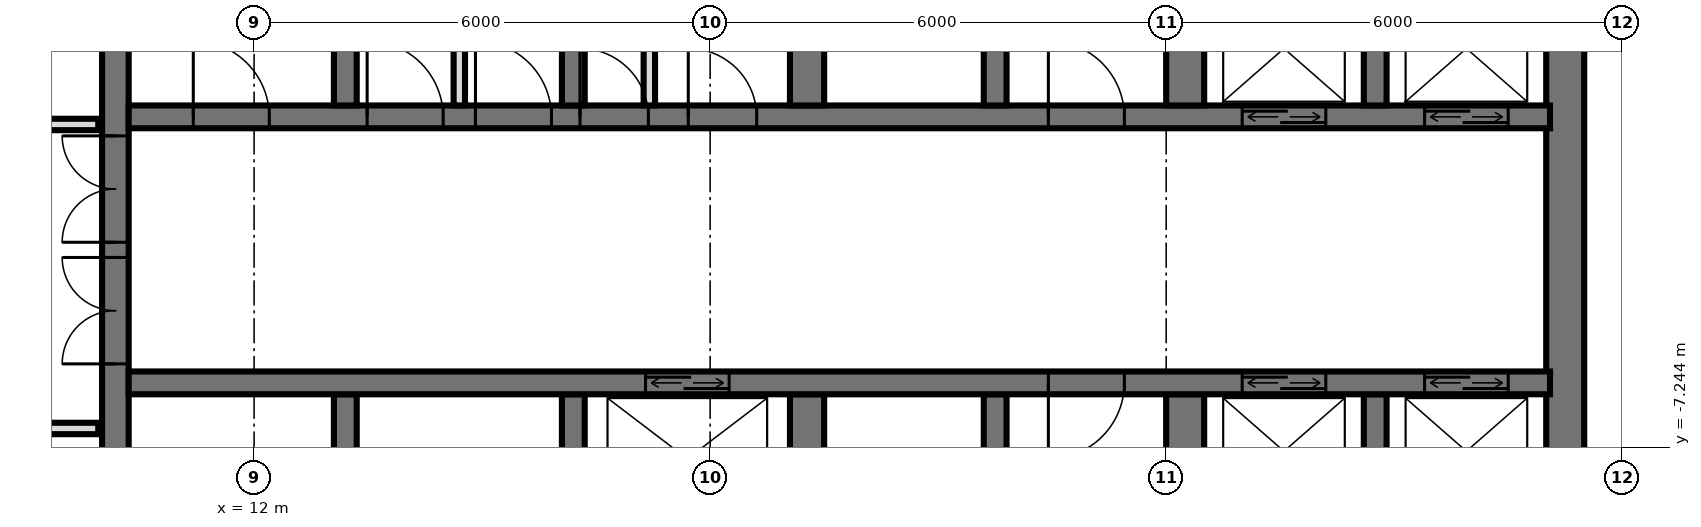
"""IFC4 building model, lengths in metres.
Left out: names, types, materials, properties, quantities, classifications, styles, units other than length and angle.
Written with IfcOpenShell. Run it as: python <this file> out.ifc"""

import sys

from ifc_helpers import new_model, si_unit, direction, frame, frame_2d, origin, place, context, subcontext, project, spatial, rectangle, extrude, element, fill, save


model = new_model("IFC4")
c1 = context("Model", 3, precision=1e-05, world=origin(), true_north=direction((0.0, 1.0)))
c2 = subcontext(c1, "Body", "Model", "MODEL_VIEW")
j1 = project(units=[si_unit("LENGTHUNIT", "METRE"), si_unit("PLANEANGLEUNIT", "RADIAN")], contexts=[c1])
p1 = place(None, origin())
s1 = spatial("IfcSite", under=j1, at=p1, CompositionType="ELEMENT")
p2 = place(p1, origin())
s2 = spatial("IfcBuilding", under=s1, at=p2, CompositionType="ELEMENT")
p3 = place(p2, frame((0.0, 0.0, 78.0)))
s3 = spatial("IfcBuildingStorey", under=s2, at=p3, CompositionType="ELEMENT", Elevation=78.0)
p4 = place(p3, frame((10.175, -14.55, 0.0), z_axis=(0.0, 0.0, 1.0), x_axis=(0.0, 1.0, 0.0)))
e1 = element("IfcWall", 1, at=p4, inside=s3, PredefinedType="SHEAR", context=c2, shape_type="SweptSolid", body=[
    extrude(rectangle(XDim=14.1, YDim=0.35, at=frame_2d((7.05, 0.0))), origin(), (0.0, 0.0, 1.0), 3.6),
])
p5 = place(p4, frame((8.4, 0.0, 0.0)))
e2 = element("IfcOpeningElement", 2, at=p5, cuts=e1, PredefinedType="OPENING", context=c2, shape_type="SweptSolid", body=[
    extrude(rectangle(XDim=1.4, YDim=2.4, at=frame_2d((0.7, 1.2))), frame((0.0, 0.185, 0.0), z_axis=(0.0, -1.0, 0.0), x_axis=(1.0, 0.0, 0.0)), (0.0, 0.0, 1.0), 0.37),
])
p6 = place(p4, frame((10.0, 0.0, 0.0)))
e3 = element("IfcOpeningElement", 3, at=p6, cuts=e1, PredefinedType="OPENING", context=c2, shape_type="SweptSolid", body=[
    extrude(rectangle(XDim=1.4, YDim=2.4, at=frame_2d((0.7, 1.2))), frame((0.0, 0.185, 0.0), z_axis=(0.0, -1.0, 0.0), x_axis=(1.0, 0.0, 0.0)), (0.0, 0.0, 1.0), 0.37),
])
p7 = place(p4, frame((4.0, 0.0, 0.0)))
e4 = element("IfcOpeningElement", 4, at=p7, cuts=e1, PredefinedType="OPENING", context=c2, shape_type="SweptSolid", body=[
    extrude(rectangle(XDim=1.2, YDim=2.1, at=frame_2d((0.6, 1.05))), frame((0.0, 0.185, 0.0), z_axis=(0.0, -1.0, 0.0), x_axis=(1.0, 0.0, 0.0)), (0.0, 0.0, 1.0), 0.37),
])
p8 = place(p3, frame((29.25, -14.55, 0.0), z_axis=(0.0, 0.0, 1.0), x_axis=(0.0, 1.0, 0.0)))
e5 = element("IfcWall", 5, at=p8, inside=s3, PredefinedType="SHEAR", context=c2, shape_type="SweptSolid", body=[
    extrude(rectangle(XDim=14.1, YDim=0.5, at=frame_2d((7.05, 0.0))), origin(), (0.0, 0.0, 1.0), 3.6),
])
p9 = place(p3, frame((10.35, -2.9, 0.0), z_axis=(0.0, 0.0, 1.0), x_axis=(1.0, 0.0, 0.0)))
e6 = element("IfcWall", 6, at=p9, inside=s3, PredefinedType="SHEAR", context=c2, shape_type="SweptSolid", body=[
    extrude(rectangle(XDim=18.7, YDim=0.3, at=frame_2d((9.35, 0.0))), origin(), (0.0, 0.0, 1.0), 3.6),
])
p10 = place(p9, frame((14.65, 0.0, 0.0)))
e7 = element("IfcOpeningElement", 7, at=p10, cuts=e6, PredefinedType="OPENING", context=c2, shape_type="SweptSolid", body=[
    extrude(rectangle(XDim=1.1, YDim=2.1, at=frame_2d((0.55, 1.05))), frame((0.0, 0.16, 0.0), z_axis=(0.0, -1.0, 0.0), x_axis=(1.0, 0.0, 0.0)), (0.0, 0.0, 1.0), 0.32),
])
p11 = place(p9, frame((17.05, 0.0, 0.0)))
e8 = element("IfcOpeningElement", 8, at=p11, cuts=e6, PredefinedType="OPENING", context=c2, shape_type="SweptSolid", body=[
    extrude(rectangle(XDim=1.1, YDim=2.1, at=frame_2d((0.55, 1.05))), frame((0.0, 0.16, 0.0), z_axis=(0.0, -1.0, 0.0), x_axis=(1.0, 0.0, 0.0)), (0.0, 0.0, 1.0), 0.32),
])
p12 = place(p9, frame((5.938, 0.0, 0.0)))
e9 = element("IfcOpeningElement", 9, at=p12, cuts=e6, PredefinedType="OPENING", context=c2, shape_type="SweptSolid", body=[
    extrude(rectangle(XDim=0.9, YDim=2.1, at=frame_2d((0.45, 1.05))), frame((0.0, 0.16, 0.0), z_axis=(0.0, -1.0, 0.0), x_axis=(1.0, 0.0, 0.0)), (0.0, 0.0, 1.0), 0.32),
])
p13 = place(p9, frame((7.363, 0.0, 0.0)))
e10 = element("IfcOpeningElement", 10, at=p13, cuts=e6, PredefinedType="OPENING", context=c2, shape_type="SweptSolid", body=[
    extrude(rectangle(XDim=0.9, YDim=2.1, at=frame_2d((0.45, 1.05))), frame((0.0, 0.16, 0.0), z_axis=(0.0, -1.0, 0.0), x_axis=(1.0, 0.0, 0.0)), (0.0, 0.0, 1.0), 0.32),
])
p14 = place(p9, frame((0.85, 0.0, 0.0)))
e11 = element("IfcOpeningElement", 11, at=p14, cuts=e6, PredefinedType="OPENING", context=c2, shape_type="SweptSolid", body=[
    extrude(rectangle(XDim=1.0, YDim=2.1, at=frame_2d((0.5, 1.05))), frame((0.0, 0.16, 0.0), z_axis=(0.0, -1.0, 0.0), x_axis=(1.0, 0.0, 0.0)), (0.0, 0.0, 1.0), 0.32),
])
p15 = place(p9, frame((3.137, 0.0, 0.0)))
e12 = element("IfcOpeningElement", 12, at=p15, cuts=e6, PredefinedType="OPENING", context=c2, shape_type="SweptSolid", body=[
    extrude(rectangle(XDim=1.0, YDim=2.1, at=frame_2d((0.5, 1.05))), frame((0.0, 0.16, 0.0), z_axis=(0.0, -1.0, 0.0), x_axis=(1.0, 0.0, 0.0)), (0.0, 0.0, 1.0), 0.32),
])
p16 = place(p9, frame((4.562, 0.0, 0.0)))
e13 = element("IfcOpeningElement", 13, at=p16, cuts=e6, PredefinedType="OPENING", context=c2, shape_type="SweptSolid", body=[
    extrude(rectangle(XDim=1.0, YDim=2.1, at=frame_2d((0.5, 1.05))), frame((0.0, 0.16, 0.0), z_axis=(0.0, -1.0, 0.0), x_axis=(1.0, 0.0, 0.0)), (0.0, 0.0, 1.0), 0.32),
])
p17 = place(p9, frame((12.1, 0.0, 0.0)))
e14 = element("IfcOpeningElement", 14, at=p17, cuts=e6, PredefinedType="OPENING", context=c2, shape_type="SweptSolid", body=[
    extrude(rectangle(XDim=1.0, YDim=2.1, at=frame_2d((0.5, 1.05))), frame((0.0, 0.16, 0.0), z_axis=(0.0, -1.0, 0.0), x_axis=(1.0, 0.0, 0.0)), (0.0, 0.0, 1.0), 0.32),
])
p18 = place(p3, frame((10.35, -6.4, 0.0), z_axis=(0.0, 0.0, 1.0), x_axis=(1.0, 0.0, 0.0)))
e15 = element("IfcWall", 15, at=p18, inside=s3, PredefinedType="SHEAR", context=c2, shape_type="SweptSolid", body=[
    extrude(rectangle(XDim=18.7, YDim=0.3, at=frame_2d((9.35, 0.0))), origin(), (0.0, 0.0, 1.0), 3.6),
])
p19 = place(p18, frame((14.65, 0.0, 0.0)))
e16 = element("IfcOpeningElement", 16, at=p19, cuts=e15, PredefinedType="OPENING", context=c2, shape_type="SweptSolid", body=[
    extrude(rectangle(XDim=1.1, YDim=2.1, at=frame_2d((0.55, 1.05))), frame((0.0, 0.16, 0.0), z_axis=(0.0, -1.0, 0.0), x_axis=(1.0, 0.0, 0.0)), (0.0, 0.0, 1.0), 0.32),
])
p20 = place(p18, frame((17.05, 0.0, 0.0)))
e17 = element("IfcOpeningElement", 17, at=p20, cuts=e15, PredefinedType="OPENING", context=c2, shape_type="SweptSolid", body=[
    extrude(rectangle(XDim=1.1, YDim=2.1, at=frame_2d((0.55, 1.05))), frame((0.0, 0.16, 0.0), z_axis=(0.0, -1.0, 0.0), x_axis=(1.0, 0.0, 0.0)), (0.0, 0.0, 1.0), 0.32),
])
p21 = place(p18, frame((6.8, 0.0, 0.0)))
e18 = element("IfcOpeningElement", 18, at=p21, cuts=e15, PredefinedType="OPENING", context=c2, shape_type="SweptSolid", body=[
    extrude(rectangle(XDim=1.1, YDim=2.1, at=frame_2d((0.55, 1.05))), frame((0.0, 0.16, 0.0), z_axis=(0.0, -1.0, 0.0), x_axis=(1.0, 0.0, 0.0)), (0.0, 0.0, 1.0), 0.32),
])
p22 = place(p18, frame((12.1, 0.0, 0.0)))
e19 = element("IfcOpeningElement", 19, at=p22, cuts=e15, PredefinedType="OPENING", context=c2, shape_type="SweptSolid", body=[
    extrude(rectangle(XDim=1.0, YDim=2.1, at=frame_2d((0.5, 1.05))), frame((0.0, 0.16, 0.0), z_axis=(0.0, -1.0, 0.0), x_axis=(1.0, 0.0, 0.0)), (0.0, 0.0, 1.0), 0.32),
])
for number, where, z_axis, x_axis in (
    (20, (13.2, -2.75, 0.0), (0.0, 0.0, 1.0), (0.0, 1.0, 0.0)),
    (21, (13.2, -8.85, 0.0), (0.0, 0.0, 1.0), (0.0, 1.0, 0.0)),
    (22, (16.2, -2.75, 0.0), (0.0, 0.0, 1.0), (0.0, 1.0, 0.0)),
    (23, (16.2, -8.85, 0.0), (0.0, 0.0, 1.0), (0.0, 1.0, 0.0)),
):
    element("IfcWall", number, at=place(p3, frame(where, z_axis=z_axis, x_axis=x_axis)), inside=s3, PredefinedType="SHEAR", context=c2, shape_type="SweptSolid", body=[
        extrude(rectangle(XDim=2.3, YDim=0.3, at=frame_2d((1.15, 0.0))), origin(), (0.0, 0.0, 1.0), 3.6),
    ])
for number, where, z_axis, x_axis in (
    (24, (19.275, -2.75, 0.0), (0.0, 0.0, 1.0), (0.0, 1.0, 0.0)),
    (25, (19.275, -8.85, 0.0), (0.0, 0.0, 1.0), (0.0, 1.0, 0.0)),
):
    element("IfcWall", number, at=place(p3, frame(where, z_axis=z_axis, x_axis=x_axis)), inside=s3, PredefinedType="SHEAR", context=c2, shape_type="SweptSolid", body=[
        extrude(rectangle(XDim=2.3, YDim=0.45, at=frame_2d((1.15, 0.0))), origin(), (0.0, 0.0, 1.0), 3.6),
    ])
for number, where, z_axis, x_axis in (
    (26, (21.75, -2.75, 0.0), (0.0, 0.0, 1.0), (0.0, 1.0, 0.0)),
    (27, (21.75, -8.85, 0.0), (0.0, 0.0, 1.0), (0.0, 1.0, 0.0)),
):
    element("IfcWall", number, at=place(p3, frame(where, z_axis=z_axis, x_axis=x_axis)), inside=s3, PredefinedType="SHEAR", context=c2, shape_type="SweptSolid", body=[
        extrude(rectangle(XDim=2.3, YDim=0.3, at=frame_2d((1.15, 0.0))), origin(), (0.0, 0.0, 1.0), 3.6),
    ])
for number, where, z_axis, x_axis in (
    (28, (24.25, -2.75, 0.0), (0.0, 0.0, 1.0), (0.0, 1.0, 0.0)),
    (29, (24.25, -8.85, 0.0), (0.0, 0.0, 1.0), (0.0, 1.0, 0.0)),
):
    element("IfcWall", number, at=place(p3, frame(where, z_axis=z_axis, x_axis=x_axis)), inside=s3, PredefinedType="SHEAR", context=c2, shape_type="SweptSolid", body=[
        extrude(rectangle(XDim=2.3, YDim=0.5, at=frame_2d((1.15, 0.0))), origin(), (0.0, 0.0, 1.0), 3.6),
    ])
for number, where, z_axis, x_axis in (
    (30, (26.75, -2.75, 0.0), (0.0, 0.0, 1.0), (0.0, 1.0, 0.0)),
    (31, (26.75, -8.85, 0.0), (0.0, 0.0, 1.0), (0.0, 1.0, 0.0)),
):
    element("IfcWall", number, at=place(p3, frame(where, z_axis=z_axis, x_axis=x_axis)), inside=s3, PredefinedType="SHEAR", context=c2, shape_type="SweptSolid", body=[
        extrude(rectangle(XDim=2.3, YDim=0.3, at=frame_2d((1.15, 0.0))), origin(), (0.0, 0.0, 1.0), 3.6),
    ])
for number, where, z_axis, x_axis in (
    (32, (17.2, -2.75, 0.0), (0.0, 0.0, 1.0), (0.0, 1.0, 0.0)),
    (33, (14.7, -2.75, 0.0), (0.0, 0.0, 1.0), (0.0, 1.0, 0.0)),
):
    element("IfcWall", number, at=place(p3, frame(where, z_axis=z_axis, x_axis=x_axis)), inside=s3, PredefinedType="PARTITIONING", context=c2, shape_type="SweptSolid", body=[
        extrude(rectangle(XDim=2.3, YDim=0.15, at=frame_2d((1.15, 0.0))), origin(), (0.0, 0.0, 1.0), 3.3),
    ])
p23 = place(p3, frame((-9.95, -7.0, 0.0), z_axis=(0.0, 0.0, 1.0), x_axis=(1.0, 0.0, 0.0)))
e34 = element("IfcWall", 34, at=p23, inside=s3, PredefinedType="PARTITIONING", context=c2, shape_type="SweptSolid", body=[
    extrude(rectangle(XDim=19.9, YDim=0.15, at=frame_2d((9.95, 0.0))), origin(), (0.0, 0.0, 1.0), 3.32),
])
p24 = place(p23, frame((9.45, 0.0, 0.0)))
e35 = element("IfcOpeningElement", 35, at=p24, cuts=e34, PredefinedType="OPENING", context=c2, shape_type="SweptSolid", body=[
    extrude(rectangle(XDim=1.0, YDim=2.1, at=frame_2d((0.5, 1.05))), frame((0.0, 0.085, 0.0), z_axis=(0.0, -1.0, 0.0), x_axis=(1.0, 0.0, 0.0)), (0.0, 0.0, 1.0), 0.17),
])
p25 = place(p23, frame((15.45, 0.0, 0.0)))
e36 = element("IfcOpeningElement", 36, at=p25, cuts=e34, PredefinedType="OPENING", context=c2, shape_type="SweptSolid", body=[
    extrude(rectangle(XDim=1.0, YDim=2.1, at=frame_2d((0.5, 1.05))), frame((0.0, 0.085, 0.0), z_axis=(0.0, -1.0, 0.0), x_axis=(1.0, 0.0, 0.0)), (0.0, 0.0, 1.0), 0.17),
])
p26 = place(p3, frame((-9.95, -3.0, 0.0), z_axis=(0.0, 0.0, 1.0), x_axis=(1.0, 0.0, 0.0)))
e37 = element("IfcWall", 37, at=p26, inside=s3, PredefinedType="PARTITIONING", context=c2, shape_type="SweptSolid", body=[
    extrude(rectangle(XDim=19.9, YDim=0.15, at=frame_2d((9.95, 0.0))), origin(), (0.0, 0.0, 1.0), 3.32),
])
p27 = place(p26, frame((2.2, 0.0, 0.0)))
e38 = element("IfcOpeningElement", 38, at=p27, cuts=e37, PredefinedType="OPENING", context=c2, shape_type="SweptSolid", body=[
    extrude(rectangle(XDim=1.0, YDim=2.1, at=frame_2d((0.5, 1.05))), frame((0.0, 0.085, 0.0), z_axis=(0.0, -1.0, 0.0), x_axis=(1.0, 0.0, 0.0)), (0.0, 0.0, 1.0), 0.17),
])
p28 = place(p26, frame((7.2, 0.0, 0.0)))
e39 = element("IfcOpeningElement", 39, at=p28, cuts=e37, PredefinedType="OPENING", context=c2, shape_type="SweptSolid", body=[
    extrude(rectangle(XDim=1.0, YDim=2.1, at=frame_2d((0.5, 1.05))), frame((0.0, 0.085, 0.0), z_axis=(0.0, -1.0, 0.0), x_axis=(1.0, 0.0, 0.0)), (0.0, 0.0, 1.0), 0.17),
])
p29 = place(p26, frame((11.7, 0.0, 0.0)))
e40 = element("IfcOpeningElement", 40, at=p29, cuts=e37, PredefinedType="OPENING", context=c2, shape_type="SweptSolid", body=[
    extrude(rectangle(XDim=1.0, YDim=2.1, at=frame_2d((0.5, 1.05))), frame((0.0, 0.085, 0.0), z_axis=(0.0, -1.0, 0.0), x_axis=(1.0, 0.0, 0.0)), (0.0, 0.0, 1.0), 0.17),
])
p30 = place(p26, frame((15.45, 0.0, 0.0)))
e41 = element("IfcOpeningElement", 41, at=p30, cuts=e37, PredefinedType="OPENING", context=c2, shape_type="SweptSolid", body=[
    extrude(rectangle(XDim=1.0, YDim=2.1, at=frame_2d((0.5, 1.05))), frame((0.0, 0.085, 0.0), z_axis=(0.0, -1.0, 0.0), x_axis=(1.0, 0.0, 0.0)), (0.0, 0.0, 1.0), 0.17),
])
p31 = place(p26, frame((18.2, 0.0, 0.0)))
e42 = element("IfcOpeningElement", 42, at=p31, cuts=e37, PredefinedType="OPENING", context=c2, shape_type="SweptSolid", body=[
    extrude(rectangle(XDim=1.0, YDim=2.1, at=frame_2d((0.5, 1.05))), frame((0.0, 0.085, 0.0), z_axis=(0.0, -1.0, 0.0), x_axis=(1.0, 0.0, 0.0)), (0.0, 0.0, 1.0), 0.17),
])
p32 = place(p10, origin())
e43 = element("IfcDoor", 43, at=p32, inside=s3, OperationType="DOUBLE_DOOR_SLIDING", PredefinedType="USERDEFINED", context=c2, shape_type="SweptSolid", body=[
    extrude(rectangle(XDim=1.1, YDim=2.1, at=frame_2d((0.55, 1.05))), frame((0.0, 0.025, 0.0), z_axis=(0.0, -1.0, 0.0), x_axis=(1.0, 0.0, 0.0)), (0.0, 0.0, 1.0), 0.05),
])
fill(e7, e43)
p33 = place(p11, origin())
e44 = element("IfcDoor", 44, at=p33, inside=s3, OperationType="DOUBLE_DOOR_SLIDING", PredefinedType="USERDEFINED", context=c2, shape_type="SweptSolid", body=[
    extrude(rectangle(XDim=1.1, YDim=2.1, at=frame_2d((0.55, 1.05))), frame((0.0, 0.025, 0.0), z_axis=(0.0, -1.0, 0.0), x_axis=(1.0, 0.0, 0.0)), (0.0, 0.0, 1.0), 0.05),
])
fill(e8, e44)
p34 = place(p19, origin())
e45 = element("IfcDoor", 45, at=p34, inside=s3, OperationType="DOUBLE_DOOR_SLIDING", PredefinedType="USERDEFINED", context=c2, shape_type="SweptSolid", body=[
    extrude(rectangle(XDim=1.1, YDim=2.1, at=frame_2d((0.55, 1.05))), frame((0.0, 0.025, 0.0), z_axis=(0.0, -1.0, 0.0), x_axis=(1.0, 0.0, 0.0)), (0.0, 0.0, 1.0), 0.05),
])
fill(e16, e45)
p35 = place(p20, origin())
e46 = element("IfcDoor", 46, at=p35, inside=s3, OperationType="DOUBLE_DOOR_SLIDING", PredefinedType="USERDEFINED", context=c2, shape_type="SweptSolid", body=[
    extrude(rectangle(XDim=1.1, YDim=2.1, at=frame_2d((0.55, 1.05))), frame((0.0, 0.025, 0.0), z_axis=(0.0, -1.0, 0.0), x_axis=(1.0, 0.0, 0.0)), (0.0, 0.0, 1.0), 0.05),
])
fill(e17, e46)
p36 = place(p21, origin())
e47 = element("IfcDoor", 47, at=p36, inside=s3, OperationType="DOUBLE_DOOR_SLIDING", PredefinedType="USERDEFINED", context=c2, shape_type="SweptSolid", body=[
    extrude(rectangle(XDim=1.1, YDim=2.1, at=frame_2d((0.55, 1.05))), frame((0.0, 0.025, 0.0), z_axis=(0.0, -1.0, 0.0), x_axis=(1.0, 0.0, 0.0)), (0.0, 0.0, 1.0), 0.05),
])
fill(e18, e47)
p37 = place(p5, origin())
e48 = element("IfcDoor", 48, at=p37, inside=s3, OperationType="DOUBLE_DOOR_SINGLE_SWING", PredefinedType="DOOR", context=c2, shape_type="SweptSolid", body=[
    extrude(rectangle(XDim=1.4, YDim=2.4, at=frame_2d((0.7, 1.2))), frame((0.0, 0.025, 0.0), z_axis=(0.0, -1.0, 0.0), x_axis=(1.0, 0.0, 0.0)), (0.0, 0.0, 1.0), 0.05),
])
fill(e2, e48)
p38 = place(p6, origin())
e49 = element("IfcDoor", 49, at=p38, inside=s3, OperationType="DOUBLE_DOOR_SINGLE_SWING", PredefinedType="DOOR", context=c2, shape_type="SweptSolid", body=[
    extrude(rectangle(XDim=1.4, YDim=2.4, at=frame_2d((0.7, 1.2))), frame((0.0, 0.025, 0.0), z_axis=(0.0, -1.0, 0.0), x_axis=(1.0, 0.0, 0.0)), (0.0, 0.0, 1.0), 0.05),
])
fill(e3, e49)
p39 = place(p12, origin())
e50 = element("IfcDoor", 50, at=p39, inside=s3, OperationType="SINGLE_SWING_RIGHT", PredefinedType="DOOR", context=c2, shape_type="SweptSolid", body=[
    extrude(rectangle(XDim=0.9, YDim=2.1, at=frame_2d((0.45, 1.05))), frame((0.0, 0.025, 0.0), z_axis=(0.0, -1.0, 0.0), x_axis=(1.0, 0.0, 0.0)), (0.0, 0.0, 1.0), 0.05),
])
fill(e9, e50)
p40 = place(p13, origin())
e51 = element("IfcDoor", 51, at=p40, inside=s3, OperationType="SINGLE_SWING_RIGHT", PredefinedType="DOOR", context=c2, shape_type="SweptSolid", body=[
    extrude(rectangle(XDim=0.9, YDim=2.1, at=frame_2d((0.45, 1.05))), frame((0.0, 0.025, 0.0), z_axis=(0.0, -1.0, 0.0), x_axis=(1.0, 0.0, 0.0)), (0.0, 0.0, 1.0), 0.05),
])
fill(e10, e51)
p41 = place(p14, origin())
e52 = element("IfcDoor", 52, at=p41, inside=s3, OperationType="SINGLE_SWING_RIGHT", PredefinedType="DOOR", context=c2, shape_type="SweptSolid", body=[
    extrude(rectangle(XDim=1.0, YDim=2.1, at=frame_2d((0.5, 1.05))), frame((0.0, 0.025, 0.0), z_axis=(0.0, -1.0, 0.0), x_axis=(1.0, 0.0, 0.0)), (0.0, 0.0, 1.0), 0.05),
])
fill(e11, e52)
p42 = place(p15, origin())
e53 = element("IfcDoor", 53, at=p42, inside=s3, OperationType="SINGLE_SWING_RIGHT", PredefinedType="DOOR", context=c2, shape_type="SweptSolid", body=[
    extrude(rectangle(XDim=1.0, YDim=2.1, at=frame_2d((0.5, 1.05))), frame((0.0, 0.025, 0.0), z_axis=(0.0, -1.0, 0.0), x_axis=(1.0, 0.0, 0.0)), (0.0, 0.0, 1.0), 0.05),
])
fill(e12, e53)
p43 = place(p16, origin())
e54 = element("IfcDoor", 54, at=p43, inside=s3, OperationType="SINGLE_SWING_RIGHT", PredefinedType="DOOR", context=c2, shape_type="SweptSolid", body=[
    extrude(rectangle(XDim=1.0, YDim=2.1, at=frame_2d((0.5, 1.05))), frame((0.0, 0.025, 0.0), z_axis=(0.0, -1.0, 0.0), x_axis=(1.0, 0.0, 0.0)), (0.0, 0.0, 1.0), 0.05),
])
fill(e13, e54)
p44 = place(p17, origin())
e55 = element("IfcDoor", 55, at=p44, inside=s3, OperationType="SINGLE_SWING_RIGHT", PredefinedType="DOOR", context=c2, shape_type="SweptSolid", body=[
    extrude(rectangle(XDim=1.0, YDim=2.1, at=frame_2d((0.5, 1.05))), frame((0.0, 0.025, 0.0), z_axis=(0.0, -1.0, 0.0), x_axis=(1.0, 0.0, 0.0)), (0.0, 0.0, 1.0), 0.05),
])
fill(e14, e55)
p45 = place(p22, frame((0.5, 0.0, 0.0), z_axis=(0.0, 0.0, 1.0), x_axis=(-1.0, 0.0, 0.0)))
e56 = element("IfcDoor", 56, at=p45, inside=s3, OperationType="SINGLE_SWING_LEFT", PredefinedType="DOOR", context=c2, shape_type="SweptSolid", body=[
    extrude(rectangle(XDim=1.0, YDim=2.1, at=frame_2d((0.0, 1.05))), frame((0.0, -0.025, 0.0), z_axis=(0.0, 1.0, 0.0), x_axis=(-1.0, 0.0, 0.0)), (0.0, 0.0, 1.0), 0.05),
])
fill(e19, e56)
save(model, sys.argv[1])
